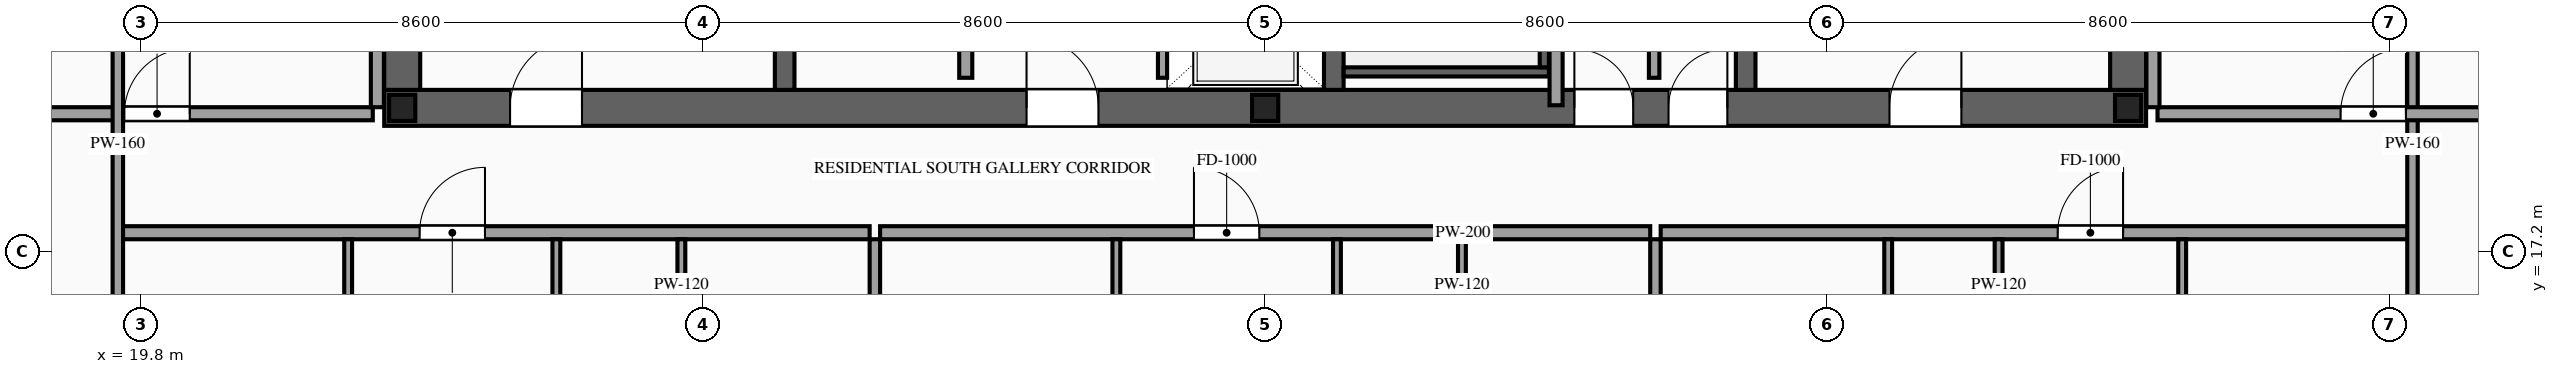
"""IFC4 building model, lengths in metres.
Left out: names, types, materials, properties, quantities, classifications, styles, units other than length and angle.
Written with IfcOpenShell. Run it as: python <this file> out.ifc"""

import sys

from ifc_helpers import new_model, si_unit, direction, frame, frame_2d, origin, origin_2d, place, context, subcontext, project, spatial, rectangle, i_section, extrude, source, transform, mapped, element, fill, save


model = new_model("IFC4")
c1 = context("Model", 3, precision=1e-05, world=origin(), true_north=direction((0.0, 1.0)))
c2 = subcontext(c1, "Body", "Model", "MODEL_VIEW")
j1 = project(units=[si_unit("LENGTHUNIT", "METRE"), si_unit("PLANEANGLEUNIT", "RADIAN")], contexts=[c1])
p1 = place(None, origin())
s1 = spatial("IfcSite", under=j1, at=p1, CompositionType="ELEMENT")
p2 = place(p1, origin())
s2 = spatial("IfcBuilding", under=s1, at=p2, CompositionType="ELEMENT")
p3 = place(p2, frame((0.0, 0.0, 248.6)))
s3 = spatial("IfcBuildingStorey", under=s2, at=p3, CompositionType="ELEMENT", Elevation=248.6)
p4 = place(p3, frame((23.525, 19.4, 0.0), z_axis=(0.0, 0.0, 1.0), x_axis=(1.0, 0.0, 0.0)))
e1 = element("IfcWall", 1, at=p4, inside=s3, PredefinedType="SHEAR", context=c2, shape_type="SweptSolid", body=[
    extrude(rectangle(XDim=26.95, YDim=0.55, at=frame_2d((13.475, 0.0))), origin(), (0.0, 0.0, 1.0), 3.5),
])
p5 = place(p4, frame((1.925, 0.0, 0.0)))
e2 = element("IfcOpeningElement", 2, at=p5, cuts=e1, PredefinedType="OPENING", context=c2, shape_type="SweptSolid", body=[
    extrude(rectangle(XDim=1.1, YDim=2.2, at=frame_2d((0.55, 1.1))), frame((0.0, 0.29, 0.0), z_axis=(0.0, -1.0, 0.0), x_axis=(1.0, 0.0, 0.0)), (0.0, 0.0, 1.0), 0.58),
])
p6 = place(p4, frame((9.825, 0.0, 0.0)))
e3 = element("IfcOpeningElement", 3, at=p6, cuts=e1, PredefinedType="OPENING", context=c2, shape_type="SweptSolid", body=[
    extrude(rectangle(XDim=1.1, YDim=2.2, at=frame_2d((0.55, 1.1))), frame((0.0, 0.29, 0.0), z_axis=(0.0, -1.0, 0.0), x_axis=(1.0, 0.0, 0.0)), (0.0, 0.0, 1.0), 0.58),
])
p7 = place(p4, frame((23.025, 0.0, 0.0)))
e4 = element("IfcOpeningElement", 4, at=p7, cuts=e1, PredefinedType="OPENING", context=c2, shape_type="SweptSolid", body=[
    extrude(rectangle(XDim=1.1, YDim=2.2, at=frame_2d((0.55, 1.1))), frame((0.0, 0.29, 0.0), z_axis=(0.0, -1.0, 0.0), x_axis=(1.0, 0.0, 0.0)), (0.0, 0.0, 1.0), 0.58),
])
p8 = place(p4, frame((19.645, 0.0, 0.0)))
e5 = element("IfcOpeningElement", 5, at=p8, cuts=e1, PredefinedType="OPENING", context=c2, shape_type="SweptSolid", body=[
    extrude(rectangle(XDim=0.9, YDim=2.15, at=frame_2d((0.45, 1.075))), frame((0.0, 0.29, 0.0), z_axis=(0.0, -1.0, 0.0), x_axis=(1.0, 0.0, 0.0)), (0.0, 0.0, 1.0), 0.58),
])
p9 = place(p4, frame((18.205, 0.0, 0.0)))
e6 = element("IfcOpeningElement", 6, at=p9, cuts=e1, PredefinedType="OPENING", context=c2, shape_type="SweptSolid", body=[
    extrude(rectangle(XDim=0.9, YDim=2.15, at=frame_2d((0.45, 1.075))), frame((0.0, 0.29, 0.0), z_axis=(0.0, -1.0, 0.0), x_axis=(1.0, 0.0, 0.0)), (0.0, 0.0, 1.0), 0.58),
])
m1 = source(origin(), c2, "Body", "SweptSolid", [
    extrude(rectangle(XDim=12.25, YDim=0.55, at=frame_2d((6.125, 0.0))), origin(), (0.0, 0.0, 1.0), 3.5),
])
for number, where, z_axis, x_axis in (
    (7, (23.8, 19.675, 0.0), (0.0, 0.0, 1.0), (0.0, 1.0, 0.0)),
    (8, (50.2, 19.675, 0.0), (0.0, 0.0, 1.0), (0.0, 1.0, 0.0)),
):
    element("IfcWall", number, at=place(p3, frame(where, z_axis=z_axis, x_axis=x_axis)), inside=s3, PredefinedType="SHEAR", context=c2, shape_type="MappedRepresentation", body=[
        mapped(m1, transform((0.0, 0.0, 0.0), scale=1.0)),
    ])
m2 = source(origin(), c2, "Body", "SweptSolid", [
    extrude(rectangle(XDim=12.25, YDim=0.3, at=frame_2d((6.125, 0.0))), origin(), (0.0, 0.0, 1.0), 3.5),
])
for number, where, z_axis, x_axis in (
    (9, (29.65, 19.675, 0.0), (0.0, 0.0, 1.0), (0.0, 1.0, 0.0)),
    (10, (38.05, 19.675, 0.0), (0.0, 0.0, 1.0), (0.0, 1.0, 0.0)),
    (11, (44.35, 19.675, 0.0), (0.0, 0.0, 1.0), (0.0, 1.0, 0.0)),
):
    element("IfcWall", number, at=place(p3, frame(where, z_axis=z_axis, x_axis=x_axis)), inside=s3, PredefinedType="SOLIDWALL", context=c2, shape_type="MappedRepresentation", body=[
        mapped(m2, transform((0.0, 0.0, 0.0), scale=1.0)),
    ])
m3 = source(origin(), c2, "Body", "SweptSolid", [
    extrude(i_section(OverallWidth=0.4, OverallDepth=0.4, WebThickness=0.013, FlangeThickness=0.021, at=origin_2d()), origin(), (0.0, 0.0, 1.0), 3.5),
])
for number, where, z_axis, x_axis in (
    (12, (23.8, 19.4, 0.0), (0.0, 0.0, 1.0), (1.0, 0.0, 0.0)),
    (13, (37.0, 19.4, 0.0), (0.0, 0.0, 1.0), (1.0, 0.0, 0.0)),
    (14, (50.2, 19.4, 0.0), (0.0, 0.0, 1.0), (1.0, 0.0, 0.0)),
):
    element("IfcColumn", number, at=place(p3, frame(where, z_axis=z_axis, x_axis=x_axis)), inside=s3, PredefinedType="COLUMN", context=c2, shape_type="MappedRepresentation", body=[
        mapped(m3, transform((0.0, 0.0, 0.0), scale=1.0)),
    ])
p10 = place(p3, frame((35.43, 19.86, 0.0), z_axis=(0.0, 0.0, 1.0), x_axis=(0.0, 1.0, 0.0)))
e15 = element("IfcWall", 15, at=p10, inside=s3, PredefinedType="SOLIDWALL", context=c2, shape_type="SweptSolid", body=[
    extrude(rectangle(XDim=2.04, YDim=0.14, at=frame_2d((1.02, 0.0))), origin(), (0.0, 0.0, 1.0), 3.28),
])
p11 = place(p10, frame((0.47, 0.0, 0.0)))
e16 = element("IfcOpeningElement", 16, at=p11, cuts=e15, PredefinedType="OPENING", context=c2, shape_type="SweptSolid", body=[
    extrude(rectangle(XDim=1.1, YDim=2.2, at=frame_2d((0.55, 1.1))), frame((0.0, 0.085, 0.0), z_axis=(0.0, -1.0, 0.0), x_axis=(1.0, 0.0, 0.0)), (0.0, 0.0, 1.0), 0.17),
])
m4 = source(origin(), c2, "Body", "SweptSolid", [
    extrude(rectangle(XDim=3.14, YDim=0.14, at=frame_2d((1.57, 0.0))), origin(), (0.0, 0.0, 1.0), 3.28),
])
p12 = place(p3, frame((38.2, 19.95, 0.0), z_axis=(0.0, 0.0, 1.0), x_axis=(1.0, 0.0, 0.0)))
e17 = element("IfcWall", 17, at=p12, inside=s3, PredefinedType="SOLIDWALL", context=c2, shape_type="MappedRepresentation", body=[
    mapped(m4, transform((0.0, 0.0, 0.0), scale=1.0)),
])
m5 = source(origin(), c2, "Body", "SweptSolid", [
    extrude(rectangle(XDim=8.94, YDim=0.14, at=frame_2d((4.47, 0.0))), origin(), (0.0, 0.0, 1.0), 3.28),
])
p13 = place(p3, frame((41.27, 20.02, 0.0), z_axis=(0.0, 0.0, 1.0), x_axis=(0.0, 1.0, 0.0)))
e18 = element("IfcWall", 18, at=p13, inside=s3, PredefinedType="SOLIDWALL", context=c2, shape_type="MappedRepresentation", body=[
    mapped(m5, transform((0.0, 0.0, 0.0), scale=1.0)),
])
p14 = place(p3, frame((32.42, 19.86, 0.0), z_axis=(0.0, 0.0, 1.0), x_axis=(0.0, 1.0, 0.0)))
e19 = element("IfcWall", 19, at=p14, inside=s3, PredefinedType="PARTITIONING", context=c2, shape_type="SweptSolid", body=[
    extrude(rectangle(XDim=11.88, YDim=0.2, at=frame_2d((5.94, 0.0))), origin(), (0.0, 0.0, 1.0), 3.28),
])
p15 = place(p14, frame((5.49, 0.0, 0.0)))
e20 = element("IfcOpeningElement", 20, at=p15, cuts=e19, PredefinedType="OPENING", context=c2, shape_type="SweptSolid", body=[
    extrude(rectangle(XDim=0.9, YDim=2.15, at=frame_2d((0.45, 1.075))), frame((0.0, 0.115, 0.0), z_axis=(0.0, -1.0, 0.0), x_axis=(1.0, 0.0, 0.0)), (0.0, 0.0, 1.0), 0.23),
])
m6 = source(origin(), c2, "Body", "SweptSolid", [
    extrude(rectangle(XDim=1.34, YDim=0.16, at=frame_2d((0.67, 0.0))), origin(), (0.0, 0.0, 1.0), 3.28),
])
p16 = place(p3, frame((42.95, 19.86, 0.0), z_axis=(0.0, 0.0, 1.0), x_axis=(0.0, 1.0, 0.0)))
e21 = element("IfcWall", 21, at=p16, inside=s3, PredefinedType="PARTITIONING", context=c2, shape_type="MappedRepresentation", body=[
    mapped(m6, transform((0.0, 0.0, 0.0), scale=1.0)),
])
m7 = source(origin(), c2, "Body", "SweptSolid", [
    extrude(rectangle(XDim=12.72, YDim=0.2, at=frame_2d((6.36, 0.0))), origin(), (0.0, 0.0, 1.0), 3.28),
])
p17 = place(p3, frame((41.45, 19.44, 0.0), z_axis=(0.0, 0.0, 1.0), x_axis=(0.0, 1.0, 0.0)))
e22 = element("IfcWall", 22, at=p17, inside=s3, PredefinedType="PARTITIONING", context=c2, shape_type="MappedRepresentation", body=[
    mapped(m7, transform((0.0, 0.0, 0.0), scale=1.0)),
])
p18 = place(p3, frame((19.44, 17.49, 0.0), z_axis=(0.0, 0.0, 1.0), x_axis=(1.0, 0.0, 0.0)))
e23 = element("IfcWall", 23, at=p18, inside=s3, PredefinedType="PARTITIONING", context=c2, shape_type="SweptSolid", body=[
    extrude(rectangle(XDim=11.51, YDim=0.2, at=frame_2d((5.755, 0.0))), origin(), (0.0, 0.0, 1.0), 3.28),
])
p19 = place(p18, frame((4.626, 0.0, 0.0)))
e24 = element("IfcOpeningElement", 24, at=p19, cuts=e23, PredefinedType="OPENING", context=c2, shape_type="SweptSolid", body=[
    extrude(rectangle(XDim=1.0, YDim=2.2, at=frame_2d((0.5, 1.1))), frame((0.0, 0.115, 0.0), z_axis=(0.0, -1.0, 0.0), x_axis=(1.0, 0.0, 0.0)), (0.0, 0.0, 1.0), 0.23),
])
m8 = source(origin(), c2, "Body", "SweptSolid", [
    extrude(rectangle(XDim=12.04, YDim=0.16, at=frame_2d((6.02, 0.0))), origin(), (0.0, 0.0, 1.0), 3.28),
])
p20 = place(p3, frame((31.03, 5.35, 0.0), z_axis=(0.0, 0.0, 1.0), x_axis=(0.0, 1.0, 0.0)))
e25 = element("IfcWall", 25, at=p20, inside=s3, PredefinedType="PARTITIONING", context=c2, shape_type="MappedRepresentation", body=[
    mapped(m8, transform((0.0, 0.0, 0.0), scale=1.0)),
])
m9 = source(origin(), c2, "Body", "SweptSolid", [
    extrude(rectangle(XDim=4.11, YDim=0.12, at=frame_2d((2.055, 0.0))), origin(), (0.0, 0.0, 1.0), 3.28),
])
p21 = place(p3, frame((22.973, 13.28, 0.0), z_axis=(0.0, 0.0, 1.0), x_axis=(0.0, 1.0, 0.0)))
e26 = element("IfcWall", 26, at=p21, inside=s3, PredefinedType="PARTITIONING", context=c2, shape_type="MappedRepresentation", body=[
    mapped(m9, transform((0.0, 0.0, 0.0), scale=1.0)),
])
p22 = place(p3, frame((28.07, 13.28, 0.0), z_axis=(0.0, 0.0, 1.0), x_axis=(0.0, 1.0, 0.0)))
e27 = element("IfcWall", 27, at=p22, inside=s3, PredefinedType="PARTITIONING", context=c2, shape_type="SweptSolid", body=[
    extrude(rectangle(XDim=4.11, YDim=0.12, at=frame_2d((2.055, 0.0))), origin(), (0.0, 0.0, 1.0), 3.28),
])
p23 = place(p22, frame((1.63, 0.0, 0.0)))
e28 = element("IfcOpeningElement", 28, at=p23, cuts=e27, PredefinedType="OPENING", context=c2, shape_type="SweptSolid", body=[
    extrude(rectangle(XDim=0.85, YDim=2.1, at=frame_2d((0.425, 1.05))), frame((0.0, 0.075, 0.0), z_axis=(0.0, -1.0, 0.0), x_axis=(1.0, 0.0, 0.0)), (0.0, 0.0, 1.0), 0.15),
])
p24 = place(p3, frame((26.158, 13.28, 0.0), z_axis=(0.0, 0.0, 1.0), x_axis=(0.0, 1.0, 0.0)))
e29 = element("IfcWall", 29, at=p24, inside=s3, PredefinedType="PARTITIONING", context=c2, shape_type="SweptSolid", body=[
    extrude(rectangle(XDim=4.11, YDim=0.12, at=frame_2d((2.055, 0.0))), origin(), (0.0, 0.0, 1.0), 3.28),
])
p25 = place(p24, frame((1.63, 0.0, 0.0)))
e30 = element("IfcOpeningElement", 30, at=p25, cuts=e29, PredefinedType="OPENING", context=c2, shape_type="SweptSolid", body=[
    extrude(rectangle(XDim=0.85, YDim=2.1, at=frame_2d((0.425, 1.05))), frame((0.0, 0.075, 0.0), z_axis=(0.0, -1.0, 0.0), x_axis=(1.0, 0.0, 0.0)), (0.0, 0.0, 1.0), 0.15),
])
p26 = place(p3, frame((31.11, 17.49, 0.0), z_axis=(0.0, 0.0, 1.0), x_axis=(1.0, 0.0, 0.0)))
e31 = element("IfcWall", 31, at=p26, inside=s3, PredefinedType="PARTITIONING", context=c2, shape_type="SweptSolid", body=[
    extrude(rectangle(XDim=11.78, YDim=0.2, at=frame_2d((5.89, 0.0))), origin(), (0.0, 0.0, 1.0), 3.28),
])
p27 = place(p26, frame((4.801, 0.0, 0.0)))
e32 = element("IfcOpeningElement", 32, at=p27, cuts=e31, PredefinedType="OPENING", context=c2, shape_type="SweptSolid", body=[
    extrude(rectangle(XDim=1.0, YDim=2.2, at=frame_2d((0.5, 1.1))), frame((0.0, 0.115, 0.0), z_axis=(0.0, -1.0, 0.0), x_axis=(1.0, 0.0, 0.0)), (0.0, 0.0, 1.0), 0.23),
])
p28 = place(p3, frame((42.97, 5.35, 0.0), z_axis=(0.0, 0.0, 1.0), x_axis=(0.0, 1.0, 0.0)))
e33 = element("IfcWall", 33, at=p28, inside=s3, PredefinedType="PARTITIONING", context=c2, shape_type="MappedRepresentation", body=[
    mapped(m8, transform((0.0, 0.0, 0.0), scale=1.0)),
])
p29 = place(p3, frame((34.724, 13.28, 0.0), z_axis=(0.0, 0.0, 1.0), x_axis=(0.0, 1.0, 0.0)))
e34 = element("IfcWall", 34, at=p29, inside=s3, PredefinedType="PARTITIONING", context=c2, shape_type="MappedRepresentation", body=[
    mapped(m9, transform((0.0, 0.0, 0.0), scale=1.0)),
])
p30 = place(p3, frame((40.01, 13.28, 0.0), z_axis=(0.0, 0.0, 1.0), x_axis=(0.0, 1.0, 0.0)))
e35 = element("IfcWall", 35, at=p30, inside=s3, PredefinedType="PARTITIONING", context=c2, shape_type="SweptSolid", body=[
    extrude(rectangle(XDim=4.11, YDim=0.12, at=frame_2d((2.055, 0.0))), origin(), (0.0, 0.0, 1.0), 3.28),
])
p31 = place(p30, frame((1.63, 0.0, 0.0)))
e36 = element("IfcOpeningElement", 36, at=p31, cuts=e35, PredefinedType="OPENING", context=c2, shape_type="SweptSolid", body=[
    extrude(rectangle(XDim=0.85, YDim=2.1, at=frame_2d((0.425, 1.05))), frame((0.0, 0.075, 0.0), z_axis=(0.0, -1.0, 0.0), x_axis=(1.0, 0.0, 0.0)), (0.0, 0.0, 1.0), 0.15),
])
p32 = place(p3, frame((38.098, 13.28, 0.0), z_axis=(0.0, 0.0, 1.0), x_axis=(0.0, 1.0, 0.0)))
e37 = element("IfcWall", 37, at=p32, inside=s3, PredefinedType="PARTITIONING", context=c2, shape_type="SweptSolid", body=[
    extrude(rectangle(XDim=4.11, YDim=0.12, at=frame_2d((2.055, 0.0))), origin(), (0.0, 0.0, 1.0), 3.28),
])
p33 = place(p32, frame((1.63, 0.0, 0.0)))
e38 = element("IfcOpeningElement", 38, at=p33, cuts=e37, PredefinedType="OPENING", context=c2, shape_type="SweptSolid", body=[
    extrude(rectangle(XDim=0.85, YDim=2.1, at=frame_2d((0.425, 1.05))), frame((0.0, 0.075, 0.0), z_axis=(0.0, -1.0, 0.0), x_axis=(1.0, 0.0, 0.0)), (0.0, 0.0, 1.0), 0.15),
])
p34 = place(p3, frame((43.05, 17.49, 0.0), z_axis=(0.0, 0.0, 1.0), x_axis=(1.0, 0.0, 0.0)))
e39 = element("IfcWall", 39, at=p34, inside=s3, PredefinedType="PARTITIONING", context=c2, shape_type="SweptSolid", body=[
    extrude(rectangle(XDim=11.51, YDim=0.2, at=frame_2d((5.755, 0.0))), origin(), (0.0, 0.0, 1.0), 3.28),
])
p35 = place(p34, frame((6.073, 0.0, 0.0)))
e40 = element("IfcOpeningElement", 40, at=p35, cuts=e39, PredefinedType="OPENING", context=c2, shape_type="SweptSolid", body=[
    extrude(rectangle(XDim=1.0, YDim=2.2, at=frame_2d((0.5, 1.1))), frame((0.0, 0.115, 0.0), z_axis=(0.0, -1.0, 0.0), x_axis=(1.0, 0.0, 0.0)), (0.0, 0.0, 1.0), 0.23),
])
p36 = place(p3, frame((46.53, 13.28, 0.0), z_axis=(0.0, 0.0, 1.0), x_axis=(0.0, 1.0, 0.0)))
e41 = element("IfcWall", 41, at=p36, inside=s3, PredefinedType="PARTITIONING", context=c2, shape_type="MappedRepresentation", body=[
    mapped(m9, transform((0.0, 0.0, 0.0), scale=1.0)),
])
p37 = place(p3, frame((48.219, 13.28, 0.0), z_axis=(0.0, 0.0, 1.0), x_axis=(0.0, 1.0, 0.0)))
e42 = element("IfcWall", 42, at=p37, inside=s3, PredefinedType="PARTITIONING", context=c2, shape_type="SweptSolid", body=[
    extrude(rectangle(XDim=4.11, YDim=0.12, at=frame_2d((2.055, 0.0))), origin(), (0.0, 0.0, 1.0), 3.28),
])
p38 = place(p37, frame((1.63, 0.0, 0.0)))
e43 = element("IfcOpeningElement", 43, at=p38, cuts=e42, PredefinedType="OPENING", context=c2, shape_type="SweptSolid", body=[
    extrude(rectangle(XDim=0.85, YDim=2.1, at=frame_2d((0.425, 1.05))), frame((0.0, 0.075, 0.0), z_axis=(0.0, -1.0, 0.0), x_axis=(1.0, 0.0, 0.0)), (0.0, 0.0, 1.0), 0.15),
])
p39 = place(p3, frame((51.027, 13.28, 0.0), z_axis=(0.0, 0.0, 1.0), x_axis=(0.0, 1.0, 0.0)))
e44 = element("IfcWall", 44, at=p39, inside=s3, PredefinedType="PARTITIONING", context=c2, shape_type="MappedRepresentation", body=[
    mapped(m9, transform((0.0, 0.0, 0.0), scale=1.0)),
])
p40 = place(p3, frame((16.55, 19.31, 0.0), z_axis=(0.0, 0.0, 1.0), x_axis=(1.0, 0.0, 0.0)))
e45 = element("IfcWall", 45, at=p40, inside=s3, PredefinedType="PARTITIONING", context=c2, shape_type="SweptSolid", body=[
    extrude(rectangle(XDim=6.8, YDim=0.2, at=frame_2d((3.4, 0.0))), origin(), (0.0, 0.0, 1.0), 2.825),
])
p41 = place(p40, frame((3.0, 0.0, 0.0)))
e46 = element("IfcOpeningElement", 46, at=p41, cuts=e45, PredefinedType="OPENING", context=c2, shape_type="SweptSolid", body=[
    extrude(rectangle(XDim=1.0, YDim=2.2, at=frame_2d((0.5, 1.1))), frame((0.0, 0.115, 0.0), z_axis=(0.0, -1.0, 0.0), x_axis=(1.0, 0.0, 0.0)), (0.0, 0.0, 1.0), 0.23),
])
m10 = source(origin(), c2, "Body", "SweptSolid", [
    extrude(rectangle(XDim=6.29, YDim=0.2, at=frame_2d((3.145, 0.0))), origin(), (0.0, 0.0, 1.0), 3.28),
])
p42 = place(p3, frame((23.42, 19.41, 0.0), z_axis=(0.0, 0.0, 1.0), x_axis=(0.0, 1.0, 0.0)))
e47 = element("IfcWall", 47, at=p42, inside=s3, PredefinedType="PARTITIONING", context=c2, shape_type="MappedRepresentation", body=[
    mapped(m10, transform((0.0, 0.0, 0.0), scale=1.0)),
])
m11 = source(origin(), c2, "Body", "SweptSolid", [
    extrude(rectangle(XDim=26.69, YDim=0.16, at=frame_2d((13.345, 0.0))), origin(), (0.0, 0.0, 1.0), 3.28),
])
for number, where, z_axis, x_axis in (
    (48, (19.45, 5.5, 0.0), (0.0, 0.0, 1.0), (0.0, 1.0, 0.0)),
    (49, (54.55, 5.5, 0.0), (0.0, 0.0, 1.0), (0.0, 1.0, 0.0)),
):
    element("IfcWall", number, at=place(p3, frame(where, z_axis=z_axis, x_axis=x_axis)), inside=s3, PredefinedType="PARTITIONING", context=c2, shape_type="MappedRepresentation", body=[
        mapped(m11, transform((0.0, 0.0, 0.0), scale=1.0)),
    ])
p43 = place(p3, frame((50.65, 19.31, 0.0), z_axis=(0.0, 0.0, 1.0), x_axis=(1.0, 0.0, 0.0)))
e50 = element("IfcWall", 50, at=p43, inside=s3, PredefinedType="PARTITIONING", context=c2, shape_type="SweptSolid", body=[
    extrude(rectangle(XDim=6.8, YDim=0.2, at=frame_2d((3.4, 0.0))), origin(), (0.0, 0.0, 1.0), 2.825),
])
p44 = place(p43, frame((2.8, 0.0, 0.0)))
e51 = element("IfcOpeningElement", 51, at=p44, cuts=e50, PredefinedType="OPENING", context=c2, shape_type="SweptSolid", body=[
    extrude(rectangle(XDim=1.0, YDim=2.2, at=frame_2d((0.5, 1.1))), frame((0.0, 0.115, 0.0), z_axis=(0.0, -1.0, 0.0), x_axis=(1.0, 0.0, 0.0)), (0.0, 0.0, 1.0), 0.23),
])
p45 = place(p3, frame((50.58, 19.41, 0.0), z_axis=(0.0, 0.0, 1.0), x_axis=(0.0, 1.0, 0.0)))
e52 = element("IfcWall", 52, at=p45, inside=s3, PredefinedType="PARTITIONING", context=c2, shape_type="MappedRepresentation", body=[
    mapped(m10, transform((0.0, 0.0, 0.0), scale=1.0)),
])
m12 = source(origin(), c2, "Body", "SweptSolid", [
    extrude(rectangle(XDim=1.1, YDim=2.2, at=frame_2d((0.55, 1.1))), frame((0.0, 0.025, 0.0), z_axis=(0.0, -1.0, 0.0), x_axis=(1.0, 0.0, 0.0)), (0.0, 0.0, 1.0), 0.05),
])
p46 = place(p5, origin())
e53 = element("IfcDoor", 53, at=p46, inside=s3, OperationType="SINGLE_SWING_RIGHT", PredefinedType="DOOR", context=c2, shape_type="MappedRepresentation", body=[
    mapped(m12, transform((0.0, 0.0, 0.0), scale=1.0)),
])
fill(e2, e53)
p47 = place(p6, origin())
e54 = element("IfcDoor", 54, at=p47, inside=s3, OperationType="SINGLE_SWING_LEFT", PredefinedType="DOOR", context=c2, shape_type="MappedRepresentation", body=[
    mapped(m12, transform((0.0, 0.0, 0.0), scale=1.0)),
])
fill(e3, e54)
p48 = place(p7, origin())
e55 = element("IfcDoor", 55, at=p48, inside=s3, OperationType="SINGLE_SWING_RIGHT", PredefinedType="DOOR", context=c2, shape_type="MappedRepresentation", body=[
    mapped(m12, transform((0.0, 0.0, 0.0), scale=1.0)),
])
fill(e4, e55)
m13 = source(origin(), c2, "Body", "SweptSolid", [
    extrude(rectangle(XDim=0.9, YDim=2.15, at=frame_2d((0.45, 1.075))), frame((0.0, 0.025, 0.0), z_axis=(0.0, -1.0, 0.0), x_axis=(1.0, 0.0, 0.0)), (0.0, 0.0, 1.0), 0.05),
])
p49 = place(p8, origin())
e56 = element("IfcDoor", 56, at=p49, inside=s3, OperationType="SINGLE_SWING_RIGHT", PredefinedType="DOOR", context=c2, shape_type="MappedRepresentation", body=[
    mapped(m13, transform((0.0, 0.0, 0.0), scale=1.0)),
])
fill(e5, e56)
p50 = place(p9, origin())
e57 = element("IfcDoor", 57, at=p50, inside=s3, OperationType="SINGLE_SWING_LEFT", PredefinedType="DOOR", context=c2, shape_type="MappedRepresentation", body=[
    mapped(m13, transform((0.0, 0.0, 0.0), scale=1.0)),
])
fill(e6, e57)
m14 = source(origin(), c2, "Body", "SweptSolid", [
    extrude(rectangle(XDim=1.0, YDim=2.2, at=frame_2d((0.5, 1.1))), frame((0.0, 0.025, 0.0), z_axis=(0.0, -1.0, 0.0), x_axis=(1.0, 0.0, 0.0)), (0.0, 0.0, 1.0), 0.05),
])
p51 = place(p19, origin())
e58 = element("IfcDoor", 58, at=p51, inside=s3, OperationType="SINGLE_SWING_RIGHT", PredefinedType="DOOR", context=c2, shape_type="MappedRepresentation", body=[
    mapped(m14, transform((0.0, 0.0, 0.0), scale=1.0)),
])
fill(e24, e58)
p52 = place(p27, origin())
e59 = element("IfcDoor", 59, at=p52, inside=s3, OperationType="SINGLE_SWING_LEFT", PredefinedType="DOOR", context=c2, shape_type="MappedRepresentation", body=[
    mapped(m14, transform((0.0, 0.0, 0.0), scale=1.0)),
])
fill(e32, e59)
p53 = place(p35, origin())
e60 = element("IfcDoor", 60, at=p53, inside=s3, OperationType="SINGLE_SWING_RIGHT", PredefinedType="DOOR", context=c2, shape_type="MappedRepresentation", body=[
    mapped(m14, transform((0.0, 0.0, 0.0), scale=1.0)),
])
fill(e40, e60)
p54 = place(p41, origin())
e61 = element("IfcDoor", 61, at=p54, inside=s3, OperationType="SINGLE_SWING_RIGHT", PredefinedType="DOOR", context=c2, shape_type="MappedRepresentation", body=[
    mapped(m14, transform((0.0, 0.0, 0.0), scale=1.0)),
])
fill(e46, e61)
p55 = place(p44, origin())
e62 = element("IfcDoor", 62, at=p55, inside=s3, OperationType="SINGLE_SWING_RIGHT", PredefinedType="DOOR", context=c2, shape_type="MappedRepresentation", body=[
    mapped(m14, transform((0.0, 0.0, 0.0), scale=1.0)),
])
fill(e51, e62)
save(model, sys.argv[1])
